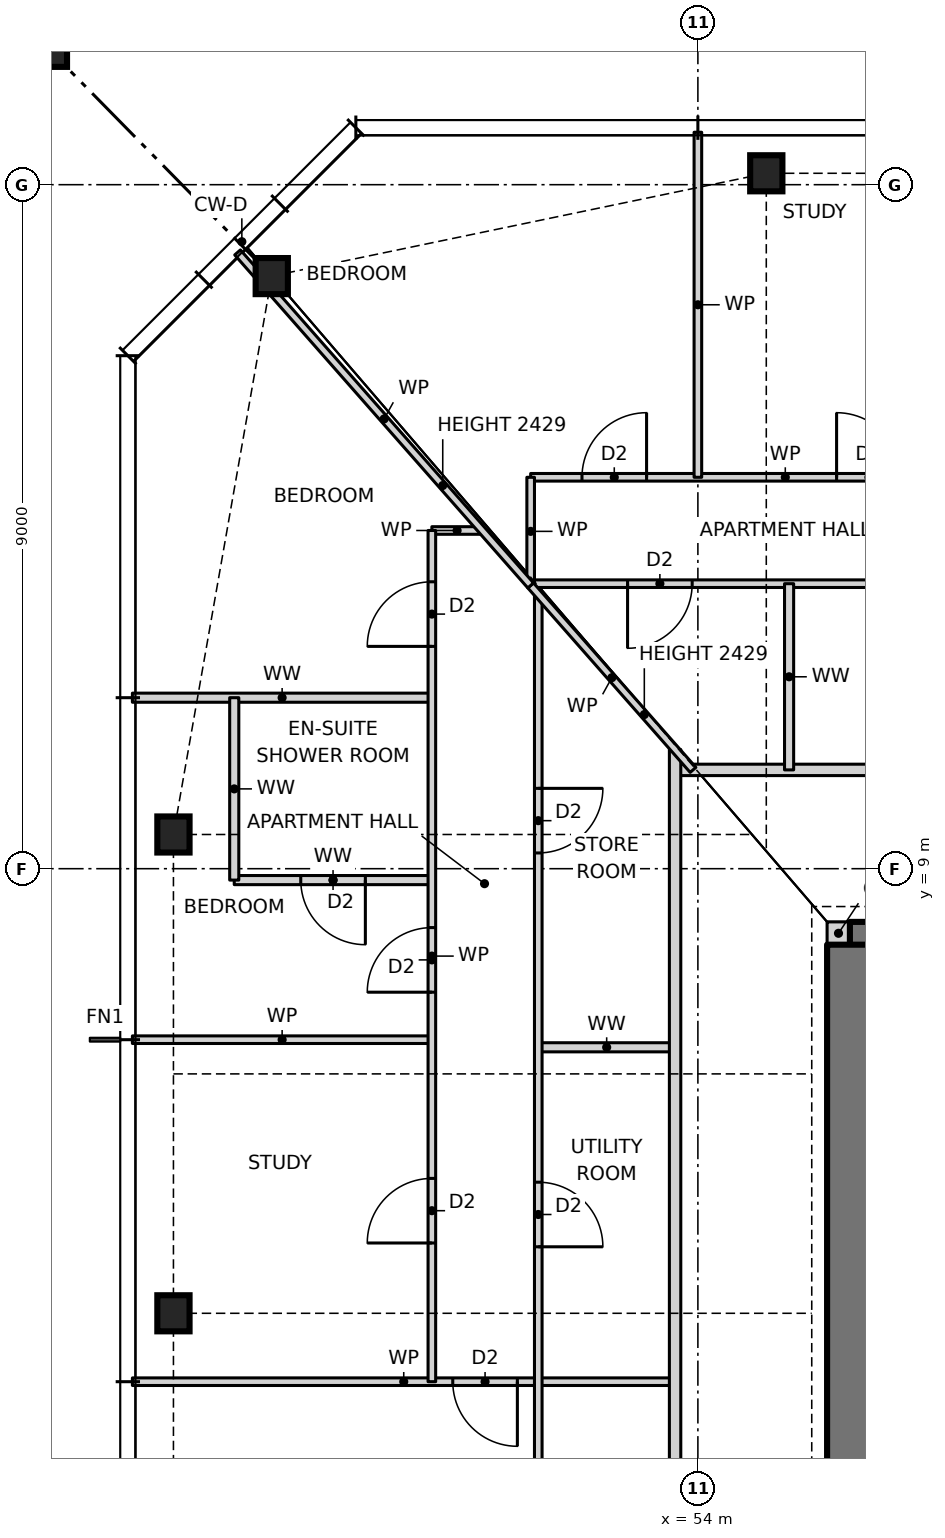
"""IFC4 building model, lengths in metres.
Left out: names, types, materials, properties, quantities, classifications, styles, units other than length and angle.
Written with IfcOpenShell. Run it as: python <this file> out.ifc"""

import sys

from ifc_helpers import new_model, si_unit, direction, frame, frame_2d, origin, origin_2d, place, context, subcontext, project, spatial, rectangle, hollow_rectangle, i_section, extrude, element, fill, save


model = new_model("IFC4")
c1 = context("Model", 3, precision=1e-05, world=origin(), true_north=direction((0.0, 1.0)))
c2 = subcontext(c1, "Body", "Model", "MODEL_VIEW")
j1 = project(units=[si_unit("LENGTHUNIT", "METRE"), si_unit("PLANEANGLEUNIT", "RADIAN")], contexts=[c1])
p1 = place(None, origin())
s1 = spatial("IfcSite", under=j1, at=p1, CompositionType="ELEMENT")
p2 = place(p1, origin())
s2 = spatial("IfcBuilding", under=s1, at=p2, CompositionType="ELEMENT")
p3 = place(p2, frame((0.0, 0.0, 18.5)))
s3 = spatial("IfcBuildingStorey", under=s2, at=p3, CompositionType="ELEMENT", Elevation=18.5)
for number, where, z_axis, x_axis in (
    (1, (54.9, 18.15, 0.0), (0.0, 0.0, 1.0), (1.0, 0.0, 0.0)),
    (2, (48.394, 16.797, 0.0), (0.0, 0.0, 1.0), (1.0, 0.0, 0.0)),
    (3, (47.1, 9.45, 0.0), (0.0, 0.0, 1.0), (1.0, 0.0, 0.0)),
    (4, (47.1, 3.15, 0.0), (0.0, 0.0, 1.0), (1.0, 0.0, 0.0)),
):
    element("IfcColumn", number, at=place(p3, frame(where, z_axis=z_axis, x_axis=x_axis)), inside=s3, PredefinedType="COLUMN", context=c2, shape_type="SweptSolid", body=[
        extrude(i_section(OverallWidth=0.424, OverallDepth=0.475, WebThickness=0.048, FlangeThickness=0.077, at=origin_2d()), origin(), (0.0, 0.0, 1.0), 3.5),
    ])
p4 = place(p3, frame((45.1, 20.15, 0.0), z_axis=(0.0, 0.0, 1.0), x_axis=(1.0, 0.0, 0.0)))
e5 = element("IfcColumn", 5, at=p4, inside=s3, PredefinedType="COLUMN", context=c2, shape_type="SweptSolid", body=[
    extrude(hollow_rectangle(XDim=1.2, YDim=1.2, WallThickness=0.07, at=origin_2d()), origin(), (0.0, 0.0, 1.0), 3.5),
])
p5 = place(p3, frame((55.7, 8.15, 0.0), z_axis=(0.0, 0.0, 1.0), x_axis=(1.0, 0.0, 0.0)))
e6 = element("IfcWall", 6, at=p5, inside=s3, PredefinedType="SOLIDWALL", context=c2, shape_type="SweptSolid", body=[
    extrude(rectangle(XDim=0.3, YDim=0.3, at=frame_2d((0.15, 0.0))), origin(), (0.0, 0.0, 1.0), 3.5),
])
p6 = place(p3, frame((70.0, 8.0, 0.0), z_axis=(0.0, 0.0, 1.0), x_axis=(-1.0, 0.0, 0.0)))
e7 = element("IfcWall", 7, at=p6, inside=s3, PredefinedType="SHEAR", context=c2, shape_type="SweptSolid", body=[
    extrude(rectangle(XDim=14.0, YDim=0.6, at=frame_2d((7.0, 0.0))), origin(), (0.0, 0.0, 1.0), 3.5),
])
p7 = place(p6, frame((8.2, 0.0, 0.0)))
e8 = element("IfcOpeningElement", 8, at=p7, cuts=e7, PredefinedType="OPENING", context=c2, shape_type="SweptSolid", body=[
    extrude(rectangle(XDim=0.9, YDim=2.1, at=frame_2d((0.45, 1.05))), frame((0.0, 0.31, 0.0), z_axis=(0.0, -1.0, 0.0), x_axis=(1.0, 0.0, 0.0)), (0.0, 0.0, 1.0), 0.62),
])
p8 = place(p6, frame((3.2, 0.0, 0.0)))
e9 = element("IfcOpeningElement", 9, at=p8, cuts=e7, PredefinedType="OPENING", context=c2, shape_type="SweptSolid", body=[
    extrude(rectangle(XDim=0.9, YDim=2.1, at=frame_2d((0.45, 1.05))), frame((0.0, 0.31, 0.0), z_axis=(0.0, -1.0, 0.0), x_axis=(1.0, 0.0, 0.0)), (0.0, 0.0, 1.0), 0.62),
])
p9 = place(p3, frame((56.0, 8.0, 0.0), z_axis=(0.0, 0.0, 1.0), x_axis=(0.0, -1.0, 0.0)))
e10 = element("IfcWall", 10, at=p9, inside=s3, PredefinedType="SHEAR", context=c2, shape_type="SweptSolid", body=[
    extrude(rectangle(XDim=16.0, YDim=0.6, at=frame_2d((8.0, 0.0))), origin(), (0.0, 0.0, 1.0), 3.5),
])
p10 = place(p9, frame((7.5, 0.0, 0.0)))
e11 = element("IfcOpeningElement", 11, at=p10, cuts=e10, PredefinedType="OPENING", context=c2, shape_type="SweptSolid", body=[
    extrude(rectangle(XDim=1.0, YDim=2.1, at=frame_2d((0.5, 1.05))), frame((0.0, 0.31, 0.0), z_axis=(0.0, -1.0, 0.0), x_axis=(1.0, 0.0, 0.0)), (0.0, 0.0, 1.0), 0.62),
])
p11 = place(p3, frame((46.56, 2.25, 0.0), z_axis=(0.0, 0.0, 1.0), x_axis=(1.0, 0.0, 0.0)))
e12 = element("IfcWall", 12, at=p11, inside=s3, PredefinedType="PARTITIONING", context=c2, shape_type="SweptSolid", body=[
    extrude(rectangle(XDim=7.14, YDim=0.1, at=frame_2d((3.57, 0.0))), origin(), (0.0, 0.0, 1.0), 3.27),
])
p12 = place(p11, frame((4.215, 0.0, 0.0)))
e13 = element("IfcOpeningElement", 13, at=p12, cuts=e12, PredefinedType="OPENING", context=c2, shape_type="SweptSolid", body=[
    extrude(rectangle(XDim=0.85, YDim=2.1, at=frame_2d((0.425, 1.05))), frame((0.0, 0.06, 0.0), z_axis=(0.0, -1.0, 0.0), x_axis=(1.0, 0.0, 0.0)), (0.0, 0.0, 1.0), 0.12),
])
p13 = place(p3, frame((51.9, 6.65, 0.0), z_axis=(0.0, 0.0, 1.0), x_axis=(1.0, 0.0, 0.0)))
e14 = element("IfcWall", 14, at=p13, inside=s3, PredefinedType="PARTITIONING", context=c2, shape_type="SweptSolid", body=[
    extrude(rectangle(XDim=1.8, YDim=0.12, at=frame_2d((0.9, 0.0))), origin(), (0.0, 0.0, 1.0), 3.27),
])
p14 = place(p3, frame((46.56, 6.75, 0.0), z_axis=(0.0, 0.0, 1.0), x_axis=(1.0, 0.0, 0.0)))
e15 = element("IfcWall", 15, at=p14, inside=s3, PredefinedType="PARTITIONING", context=c2, shape_type="SweptSolid", body=[
    extrude(rectangle(XDim=3.94, YDim=0.1, at=frame_2d((1.97, 0.0))), origin(), (0.0, 0.0, 1.0), 3.27),
])
p15 = place(p3, frame((47.9, 8.85, 0.0), z_axis=(0.0, 0.0, 1.0), x_axis=(1.0, 0.0, 0.0)))
e16 = element("IfcWall", 16, at=p15, inside=s3, PredefinedType="PARTITIONING", context=c2, shape_type="SweptSolid", body=[
    extrude(rectangle(XDim=2.6, YDim=0.12, at=frame_2d((1.3, 0.0))), origin(), (0.0, 0.0, 1.0), 3.27),
])
p16 = place(p15, frame((0.875, 0.0, 0.0)))
e17 = element("IfcOpeningElement", 17, at=p16, cuts=e16, PredefinedType="OPENING", context=c2, shape_type="SweptSolid", body=[
    extrude(rectangle(XDim=0.85, YDim=2.1, at=frame_2d((0.425, 1.05))), frame((0.0, 0.07, 0.0), z_axis=(0.0, -1.0, 0.0), x_axis=(1.0, 0.0, 0.0)), (0.0, 0.0, 1.0), 0.14),
])
p17 = place(p3, frame((53.7, 10.3, 0.0), z_axis=(0.0, 0.0, 1.0), x_axis=(1.0, 0.0, 0.0)))
e18 = element("IfcWall", 18, at=p17, inside=s3, PredefinedType="PARTITIONING", context=c2, shape_type="SweptSolid", body=[
    extrude(rectangle(XDim=18.6, YDim=0.15, at=frame_2d((9.3, 0.0))), origin(), (0.0, 0.0, 1.0), 3.27),
])
p18 = place(p17, frame((8.3, 0.0, 0.0)))
e19 = element("IfcOpeningElement", 19, at=p18, cuts=e18, PredefinedType="OPENING", context=c2, shape_type="SweptSolid", body=[
    extrude(rectangle(XDim=1.0, YDim=2.1, at=frame_2d((0.5, 1.05))), frame((0.0, 0.085, 0.0), z_axis=(0.0, -1.0, 0.0), x_axis=(1.0, 0.0, 0.0)), (0.0, 0.0, 1.0), 0.17),
])
p19 = place(p3, frame((46.56, 11.25, 0.0), z_axis=(0.0, 0.0, 1.0), x_axis=(1.0, 0.0, 0.0)))
e20 = element("IfcWall", 20, at=p19, inside=s3, PredefinedType="PARTITIONING", context=c2, shape_type="SweptSolid", body=[
    extrude(rectangle(XDim=3.94, YDim=0.12, at=frame_2d((1.97, 0.0))), origin(), (0.0, 0.0, 1.0), 3.27),
])
p20 = place(p3, frame((51.8, 12.75, 0.0), z_axis=(0.0, 0.0, 1.0), x_axis=(1.0, 0.0, 0.0)))
e21 = element("IfcWall", 21, at=p20, inside=s3, PredefinedType="PARTITIONING", context=c2, shape_type="SweptSolid", body=[
    extrude(rectangle(XDim=22.4, YDim=0.1, at=frame_2d((11.2, 0.0))), origin(), (0.0, 0.0, 1.0), 3.27),
])
p21 = place(p20, frame((13.475, 0.0, 0.0)))
e22 = element("IfcOpeningElement", 22, at=p21, cuts=e21, PredefinedType="OPENING", context=c2, shape_type="SweptSolid", body=[
    extrude(rectangle(XDim=0.85, YDim=2.1, at=frame_2d((0.425, 1.05))), frame((0.0, 0.06, 0.0), z_axis=(0.0, -1.0, 0.0), x_axis=(1.0, 0.0, 0.0)), (0.0, 0.0, 1.0), 0.12),
])
p22 = place(p20, frame((10.275, 0.0, 0.0)))
e23 = element("IfcOpeningElement", 23, at=p22, cuts=e21, PredefinedType="OPENING", context=c2, shape_type="SweptSolid", body=[
    extrude(rectangle(XDim=0.85, YDim=2.1, at=frame_2d((0.425, 1.05))), frame((0.0, 0.06, 0.0), z_axis=(0.0, -1.0, 0.0), x_axis=(1.0, 0.0, 0.0)), (0.0, 0.0, 1.0), 0.12),
])
p23 = place(p20, frame((16.925, 0.0, 0.0)))
e24 = element("IfcOpeningElement", 24, at=p23, cuts=e21, PredefinedType="OPENING", context=c2, shape_type="SweptSolid", body=[
    extrude(rectangle(XDim=0.85, YDim=2.1, at=frame_2d((0.425, 1.05))), frame((0.0, 0.06, 0.0), z_axis=(0.0, -1.0, 0.0), x_axis=(1.0, 0.0, 0.0)), (0.0, 0.0, 1.0), 0.12),
])
p24 = place(p20, frame((20.275, 0.0, 0.0)))
e25 = element("IfcOpeningElement", 25, at=p24, cuts=e21, PredefinedType="OPENING", context=c2, shape_type="SweptSolid", body=[
    extrude(rectangle(XDim=0.85, YDim=2.1, at=frame_2d((0.425, 1.05))), frame((0.0, 0.06, 0.0), z_axis=(0.0, -1.0, 0.0), x_axis=(1.0, 0.0, 0.0)), (0.0, 0.0, 1.0), 0.12),
])
p25 = place(p20, frame((4.625, 0.0, 0.0)))
e26 = element("IfcOpeningElement", 26, at=p25, cuts=e21, PredefinedType="OPENING", context=c2, shape_type="SweptSolid", body=[
    extrude(rectangle(XDim=0.85, YDim=2.1, at=frame_2d((0.425, 1.05))), frame((0.0, 0.06, 0.0), z_axis=(0.0, -1.0, 0.0), x_axis=(1.0, 0.0, 0.0)), (0.0, 0.0, 1.0), 0.12),
])
p26 = place(p20, frame((1.275, 0.0, 0.0)))
e27 = element("IfcOpeningElement", 27, at=p26, cuts=e21, PredefinedType="OPENING", context=c2, shape_type="SweptSolid", body=[
    extrude(rectangle(XDim=0.85, YDim=2.1, at=frame_2d((0.425, 1.05))), frame((0.0, 0.06, 0.0), z_axis=(0.0, -1.0, 0.0), x_axis=(1.0, 0.0, 0.0)), (0.0, 0.0, 1.0), 0.12),
])
p27 = place(p3, frame((50.5, 13.45, 0.0), z_axis=(0.0, 0.0, 1.0), x_axis=(1.0, 0.0, 0.0)))
e28 = element("IfcWall", 28, at=p27, inside=s3, PredefinedType="PARTITIONING", context=c2, shape_type="SweptSolid", body=[
    extrude(rectangle(XDim=0.664, YDim=0.1, at=frame_2d((0.332, 0.0))), origin(), (0.0, 0.0, 1.0), 3.27),
])
p28 = place(p3, frame((51.8, 14.15, 0.0), z_axis=(0.0, 0.0, 1.0), x_axis=(1.0, 0.0, 0.0)))
e29 = element("IfcWall", 29, at=p28, inside=s3, PredefinedType="PARTITIONING", context=c2, shape_type="SweptSolid", body=[
    extrude(rectangle(XDim=6.7, YDim=0.1, at=frame_2d((3.35, 0.0))), origin(), (0.0, 0.0, 1.0), 3.27),
])
p29 = place(p28, frame((4.025, 0.0, 0.0)))
e30 = element("IfcOpeningElement", 30, at=p29, cuts=e29, PredefinedType="OPENING", context=c2, shape_type="SweptSolid", body=[
    extrude(rectangle(XDim=0.85, YDim=2.1, at=frame_2d((0.425, 1.05))), frame((0.0, 0.06, 0.0), z_axis=(0.0, -1.0, 0.0), x_axis=(1.0, 0.0, 0.0)), (0.0, 0.0, 1.0), 0.12),
])
p30 = place(p28, frame((0.675, 0.0, 0.0)))
e31 = element("IfcOpeningElement", 31, at=p30, cuts=e29, PredefinedType="OPENING", context=c2, shape_type="SweptSolid", body=[
    extrude(rectangle(XDim=0.85, YDim=2.1, at=frame_2d((0.425, 1.05))), frame((0.0, 0.06, 0.0), z_axis=(0.0, -1.0, 0.0), x_axis=(1.0, 0.0, 0.0)), (0.0, 0.0, 1.0), 0.12),
])
p31 = place(p3, frame((55.2, 10.3, 0.0), z_axis=(0.0, 0.0, 1.0), x_axis=(0.0, 1.0, 0.0)))
e32 = element("IfcWall", 32, at=p31, inside=s3, PredefinedType="PARTITIONING", context=c2, shape_type="SweptSolid", body=[
    extrude(rectangle(XDim=2.45, YDim=0.12, at=frame_2d((1.225, 0.0))), origin(), (0.0, 0.0, 1.0), 3.27),
])
p32 = place(p3, frame((54.0, 14.15, 0.0), z_axis=(0.0, 0.0, 1.0), x_axis=(0.0, 1.0, 0.0)))
e33 = element("IfcWall", 33, at=p32, inside=s3, PredefinedType="PARTITIONING", context=c2, shape_type="SweptSolid", body=[
    extrude(rectangle(XDim=4.54, YDim=0.1, at=frame_2d((2.27, 0.0))), origin(), (0.0, 0.0, 1.0), 3.27),
])
p33 = place(p3, frame((53.7, -10.9, 0.0), z_axis=(0.0, 0.0, 1.0), x_axis=(0.0, 1.0, 0.0)))
e34 = element("IfcWall", 34, at=p33, inside=s3, PredefinedType="PARTITIONING", context=c2, shape_type="SweptSolid", body=[
    extrude(rectangle(XDim=21.468, YDim=0.15, at=frame_2d((10.734, 0.0))), origin(), (0.0, 0.0, 1.0), 3.27),
])
p34 = place(p33, frame((7.65, 0.0, 0.0)))
e35 = element("IfcOpeningElement", 35, at=p34, cuts=e34, PredefinedType="OPENING", context=c2, shape_type="SweptSolid", body=[
    extrude(rectangle(XDim=1.0, YDim=2.1, at=frame_2d((0.5, 1.05))), frame((0.0, 0.085, 0.0), z_axis=(0.0, -1.0, 0.0), x_axis=(1.0, 0.0, 0.0)), (0.0, 0.0, 1.0), 0.17),
])
p35 = place(p3, frame((51.9, -12.614, 0.0), z_axis=(0.0, 0.0, 1.0), x_axis=(0.0, 1.0, 0.0)))
e36 = element("IfcWall", 36, at=p35, inside=s3, PredefinedType="PARTITIONING", context=c2, shape_type="SweptSolid", body=[
    extrude(rectangle(XDim=25.228, YDim=0.1, at=frame_2d((12.614, 0.0))), origin(), (0.0, 0.0, 1.0), 3.27),
])
p36 = place(p35, frame((12.639, 0.0, 0.0)))
e37 = element("IfcOpeningElement", 37, at=p36, cuts=e36, PredefinedType="OPENING", context=c2, shape_type="SweptSolid", body=[
    extrude(rectangle(XDim=0.85, YDim=2.1, at=frame_2d((0.425, 1.05))), frame((0.0, 0.06, 0.0), z_axis=(0.0, -1.0, 0.0), x_axis=(1.0, 0.0, 0.0)), (0.0, 0.0, 1.0), 0.12),
])
p37 = place(p35, frame((9.439, 0.0, 0.0)))
e38 = element("IfcOpeningElement", 38, at=p37, cuts=e36, PredefinedType="OPENING", context=c2, shape_type="SweptSolid", body=[
    extrude(rectangle(XDim=0.85, YDim=2.1, at=frame_2d((0.425, 1.05))), frame((0.0, 0.06, 0.0), z_axis=(0.0, -1.0, 0.0), x_axis=(1.0, 0.0, 0.0)), (0.0, 0.0, 1.0), 0.12),
])
p38 = place(p35, frame((16.639, 0.0, 0.0)))
e39 = element("IfcOpeningElement", 39, at=p38, cuts=e36, PredefinedType="OPENING", context=c2, shape_type="SweptSolid", body=[
    extrude(rectangle(XDim=0.85, YDim=2.1, at=frame_2d((0.425, 1.05))), frame((0.0, 0.06, 0.0), z_axis=(0.0, -1.0, 0.0), x_axis=(1.0, 0.0, 0.0)), (0.0, 0.0, 1.0), 0.12),
])
p39 = place(p35, frame((21.821, 0.0, 0.0)))
e40 = element("IfcOpeningElement", 40, at=p39, cuts=e36, PredefinedType="OPENING", context=c2, shape_type="SweptSolid", body=[
    extrude(rectangle(XDim=0.85, YDim=2.1, at=frame_2d((0.425, 1.05))), frame((0.0, 0.06, 0.0), z_axis=(0.0, -1.0, 0.0), x_axis=(1.0, 0.0, 0.0)), (0.0, 0.0, 1.0), 0.12),
])
p40 = place(p35, frame((2.507, 0.0, 0.0)))
e41 = element("IfcOpeningElement", 41, at=p40, cuts=e36, PredefinedType="OPENING", context=c2, shape_type="SweptSolid", body=[
    extrude(rectangle(XDim=0.85, YDim=2.1, at=frame_2d((0.425, 1.05))), frame((0.0, 0.06, 0.0), z_axis=(0.0, -1.0, 0.0), x_axis=(1.0, 0.0, 0.0)), (0.0, 0.0, 1.0), 0.12),
])
p41 = place(p3, frame((51.8, 12.727, 0.0), z_axis=(0.0, 0.0, 1.0), x_axis=(0.0, 1.0, 0.0)))
e42 = element("IfcWall", 42, at=p41, inside=s3, PredefinedType="PARTITIONING", context=c2, shape_type="SweptSolid", body=[
    extrude(rectangle(XDim=1.423, YDim=0.1, at=frame_2d((0.711, 0.0))), origin(), (0.0, 0.0, 1.0), 3.27),
])
p42 = place(p3, frame((50.5, 2.25, 0.0), z_axis=(0.0, 0.0, 1.0), x_axis=(0.0, 1.0, 0.0)))
e43 = element("IfcWall", 43, at=p42, inside=s3, PredefinedType="PARTITIONING", context=c2, shape_type="SweptSolid", body=[
    extrude(rectangle(XDim=11.2, YDim=0.1, at=frame_2d((5.6, 0.0))), origin(), (0.0, 0.0, 1.0), 3.27),
])
p43 = place(p42, frame((1.825, 0.0, 0.0)))
e44 = element("IfcOpeningElement", 44, at=p43, cuts=e43, PredefinedType="OPENING", context=c2, shape_type="SweptSolid", body=[
    extrude(rectangle(XDim=0.85, YDim=2.1, at=frame_2d((0.425, 1.05))), frame((0.0, 0.06, 0.0), z_axis=(0.0, -1.0, 0.0), x_axis=(1.0, 0.0, 0.0)), (0.0, 0.0, 1.0), 0.12),
])
p44 = place(p42, frame((5.125, 0.0, 0.0)))
e45 = element("IfcOpeningElement", 45, at=p44, cuts=e43, PredefinedType="OPENING", context=c2, shape_type="SweptSolid", body=[
    extrude(rectangle(XDim=0.85, YDim=2.1, at=frame_2d((0.425, 1.05))), frame((0.0, 0.06, 0.0), z_axis=(0.0, -1.0, 0.0), x_axis=(1.0, 0.0, 0.0)), (0.0, 0.0, 1.0), 0.12),
])
p45 = place(p42, frame((9.675, 0.0, 0.0)))
e46 = element("IfcOpeningElement", 46, at=p45, cuts=e43, PredefinedType="OPENING", context=c2, shape_type="SweptSolid", body=[
    extrude(rectangle(XDim=0.85, YDim=2.1, at=frame_2d((0.425, 1.05))), frame((0.0, 0.06, 0.0), z_axis=(0.0, -1.0, 0.0), x_axis=(1.0, 0.0, 0.0)), (0.0, 0.0, 1.0), 0.12),
])
p46 = place(p3, frame((47.9, 8.85, 0.0), z_axis=(0.0, 0.0, 1.0), x_axis=(0.0, 1.0, 0.0)))
e47 = element("IfcWall", 47, at=p46, inside=s3, PredefinedType="PARTITIONING", context=c2, shape_type="SweptSolid", body=[
    extrude(rectangle(XDim=2.4, YDim=0.12, at=frame_2d((1.2, 0.0))), origin(), (0.0, 0.0, 1.0), 3.27),
])
p47 = place(p3, frame((53.936, 10.3, 0.0), z_axis=(0.0, 0.0, 1.0), x_axis=(-0.660667046586, 0.75067906162, 0.0)))
e48 = element("IfcWall", 48, at=p47, inside=s3, PredefinedType="PARTITIONING", context=c2, shape_type="SweptSolid", body=[
    extrude(rectangle(XDim=3.233, YDim=0.1, at=frame_2d((1.617, 0.0))), origin(), (0.0, 0.0, 1.0), 2.429),
])
p48 = place(p3, frame((51.8, 12.727, 0.0), z_axis=(0.0, 0.0, 1.0), x_axis=(-0.660690123093, 0.750658751529, 0.0)))
e49 = element("IfcWall", 49, at=p48, inside=s3, PredefinedType="PARTITIONING", context=c2, shape_type="SweptSolid", body=[
    extrude(rectangle(XDim=5.837, YDim=0.1, at=frame_2d((2.918, 0.0))), origin(), (0.0, 0.0, 1.0), 2.429),
])
p49 = place(p29, origin())
e50 = element("IfcDoor", 50, at=p49, inside=s3, OperationType="SINGLE_SWING_LEFT", PredefinedType="DOOR", context=c2, shape_type="SweptSolid", body=[
    extrude(rectangle(XDim=0.85, YDim=2.1, at=frame_2d((0.425, 1.05))), frame((0.0, 0.025, 0.0), z_axis=(0.0, -1.0, 0.0), x_axis=(1.0, 0.0, 0.0)), (0.0, 0.0, 1.0), 0.05),
])
fill(e30, e50)
p50 = place(p30, origin())
e51 = element("IfcDoor", 51, at=p50, inside=s3, OperationType="SINGLE_SWING_RIGHT", PredefinedType="DOOR", context=c2, shape_type="SweptSolid", body=[
    extrude(rectangle(XDim=0.85, YDim=2.1, at=frame_2d((0.425, 1.05))), frame((0.0, 0.025, 0.0), z_axis=(0.0, -1.0, 0.0), x_axis=(1.0, 0.0, 0.0)), (0.0, 0.0, 1.0), 0.05),
])
fill(e31, e51)
p51 = place(p26, frame((0.85, 0.0, 0.0), z_axis=(0.0, 0.0, 1.0), x_axis=(-1.0, 0.0, 0.0)))
e52 = element("IfcDoor", 52, at=p51, inside=s3, OperationType="SINGLE_SWING_RIGHT", PredefinedType="DOOR", context=c2, shape_type="SweptSolid", body=[
    extrude(rectangle(XDim=0.85, YDim=2.1, at=frame_2d((0.425, 1.05))), frame((0.0, 0.025, 0.0), z_axis=(0.0, -1.0, 0.0), x_axis=(1.0, 0.0, 0.0)), (0.0, 0.0, 1.0), 0.05),
])
fill(e27, e52)
p52 = place(p12, frame((0.85, 0.0, 0.0), z_axis=(0.0, 0.0, 1.0), x_axis=(-1.0, 0.0, 0.0)))
e53 = element("IfcDoor", 53, at=p52, inside=s3, OperationType="SINGLE_SWING_LEFT", PredefinedType="DOOR", context=c2, shape_type="SweptSolid", body=[
    extrude(rectangle(XDim=0.85, YDim=2.1, at=frame_2d((0.425, 1.05))), frame((0.0, 0.025, 0.0), z_axis=(0.0, -1.0, 0.0), x_axis=(1.0, 0.0, 0.0)), (0.0, 0.0, 1.0), 0.05),
])
fill(e13, e53)
p53 = place(p43, origin())
e54 = element("IfcDoor", 54, at=p53, inside=s3, OperationType="SINGLE_SWING_LEFT", PredefinedType="DOOR", context=c2, shape_type="SweptSolid", body=[
    extrude(rectangle(XDim=0.85, YDim=2.1, at=frame_2d((0.425, 1.05))), frame((0.0, 0.025, 0.0), z_axis=(0.0, -1.0, 0.0), x_axis=(1.0, 0.0, 0.0)), (0.0, 0.0, 1.0), 0.05),
])
fill(e44, e54)
p54 = place(p16, frame((0.85, 0.0, 0.0), z_axis=(0.0, 0.0, 1.0), x_axis=(-1.0, 0.0, 0.0)))
e55 = element("IfcDoor", 55, at=p54, inside=s3, OperationType="SINGLE_SWING_LEFT", PredefinedType="DOOR", context=c2, shape_type="SweptSolid", body=[
    extrude(rectangle(XDim=0.85, YDim=2.1, at=frame_2d((0.425, 1.05))), frame((0.0, 0.025, 0.0), z_axis=(0.0, -1.0, 0.0), x_axis=(1.0, 0.0, 0.0)), (0.0, 0.0, 1.0), 0.05),
])
fill(e17, e55)
p55 = place(p44, origin())
e56 = element("IfcDoor", 56, at=p55, inside=s3, OperationType="SINGLE_SWING_LEFT", PredefinedType="DOOR", context=c2, shape_type="SweptSolid", body=[
    extrude(rectangle(XDim=0.85, YDim=2.1, at=frame_2d((0.425, 1.05))), frame((0.0, 0.025, 0.0), z_axis=(0.0, -1.0, 0.0), x_axis=(1.0, 0.0, 0.0)), (0.0, 0.0, 1.0), 0.05),
])
fill(e45, e56)
p56 = place(p45, origin())
e57 = element("IfcDoor", 57, at=p56, inside=s3, OperationType="SINGLE_SWING_LEFT", PredefinedType="DOOR", context=c2, shape_type="SweptSolid", body=[
    extrude(rectangle(XDim=0.85, YDim=2.1, at=frame_2d((0.425, 1.05))), frame((0.0, 0.025, 0.0), z_axis=(0.0, -1.0, 0.0), x_axis=(1.0, 0.0, 0.0)), (0.0, 0.0, 1.0), 0.05),
])
fill(e46, e57)
p57 = place(p38, frame((0.85, 0.0, 0.0), z_axis=(0.0, 0.0, 1.0), x_axis=(-1.0, 0.0, 0.0)))
e58 = element("IfcDoor", 58, at=p57, inside=s3, OperationType="SINGLE_SWING_RIGHT", PredefinedType="DOOR", context=c2, shape_type="SweptSolid", body=[
    extrude(rectangle(XDim=0.85, YDim=2.1, at=frame_2d((0.425, 1.05))), frame((0.0, 0.025, 0.0), z_axis=(0.0, -1.0, 0.0), x_axis=(1.0, 0.0, 0.0)), (0.0, 0.0, 1.0), 0.05),
])
fill(e39, e58)
p58 = place(p39, frame((0.85, 0.0, 0.0), z_axis=(0.0, 0.0, 1.0), x_axis=(-1.0, 0.0, 0.0)))
e59 = element("IfcDoor", 59, at=p58, inside=s3, OperationType="SINGLE_SWING_LEFT", PredefinedType="DOOR", context=c2, shape_type="SweptSolid", body=[
    extrude(rectangle(XDim=0.85, YDim=2.1, at=frame_2d((0.425, 1.05))), frame((0.0, 0.025, 0.0), z_axis=(0.0, -1.0, 0.0), x_axis=(1.0, 0.0, 0.0)), (0.0, 0.0, 1.0), 0.05),
])
fill(e40, e59)
save(model, sys.argv[1])
